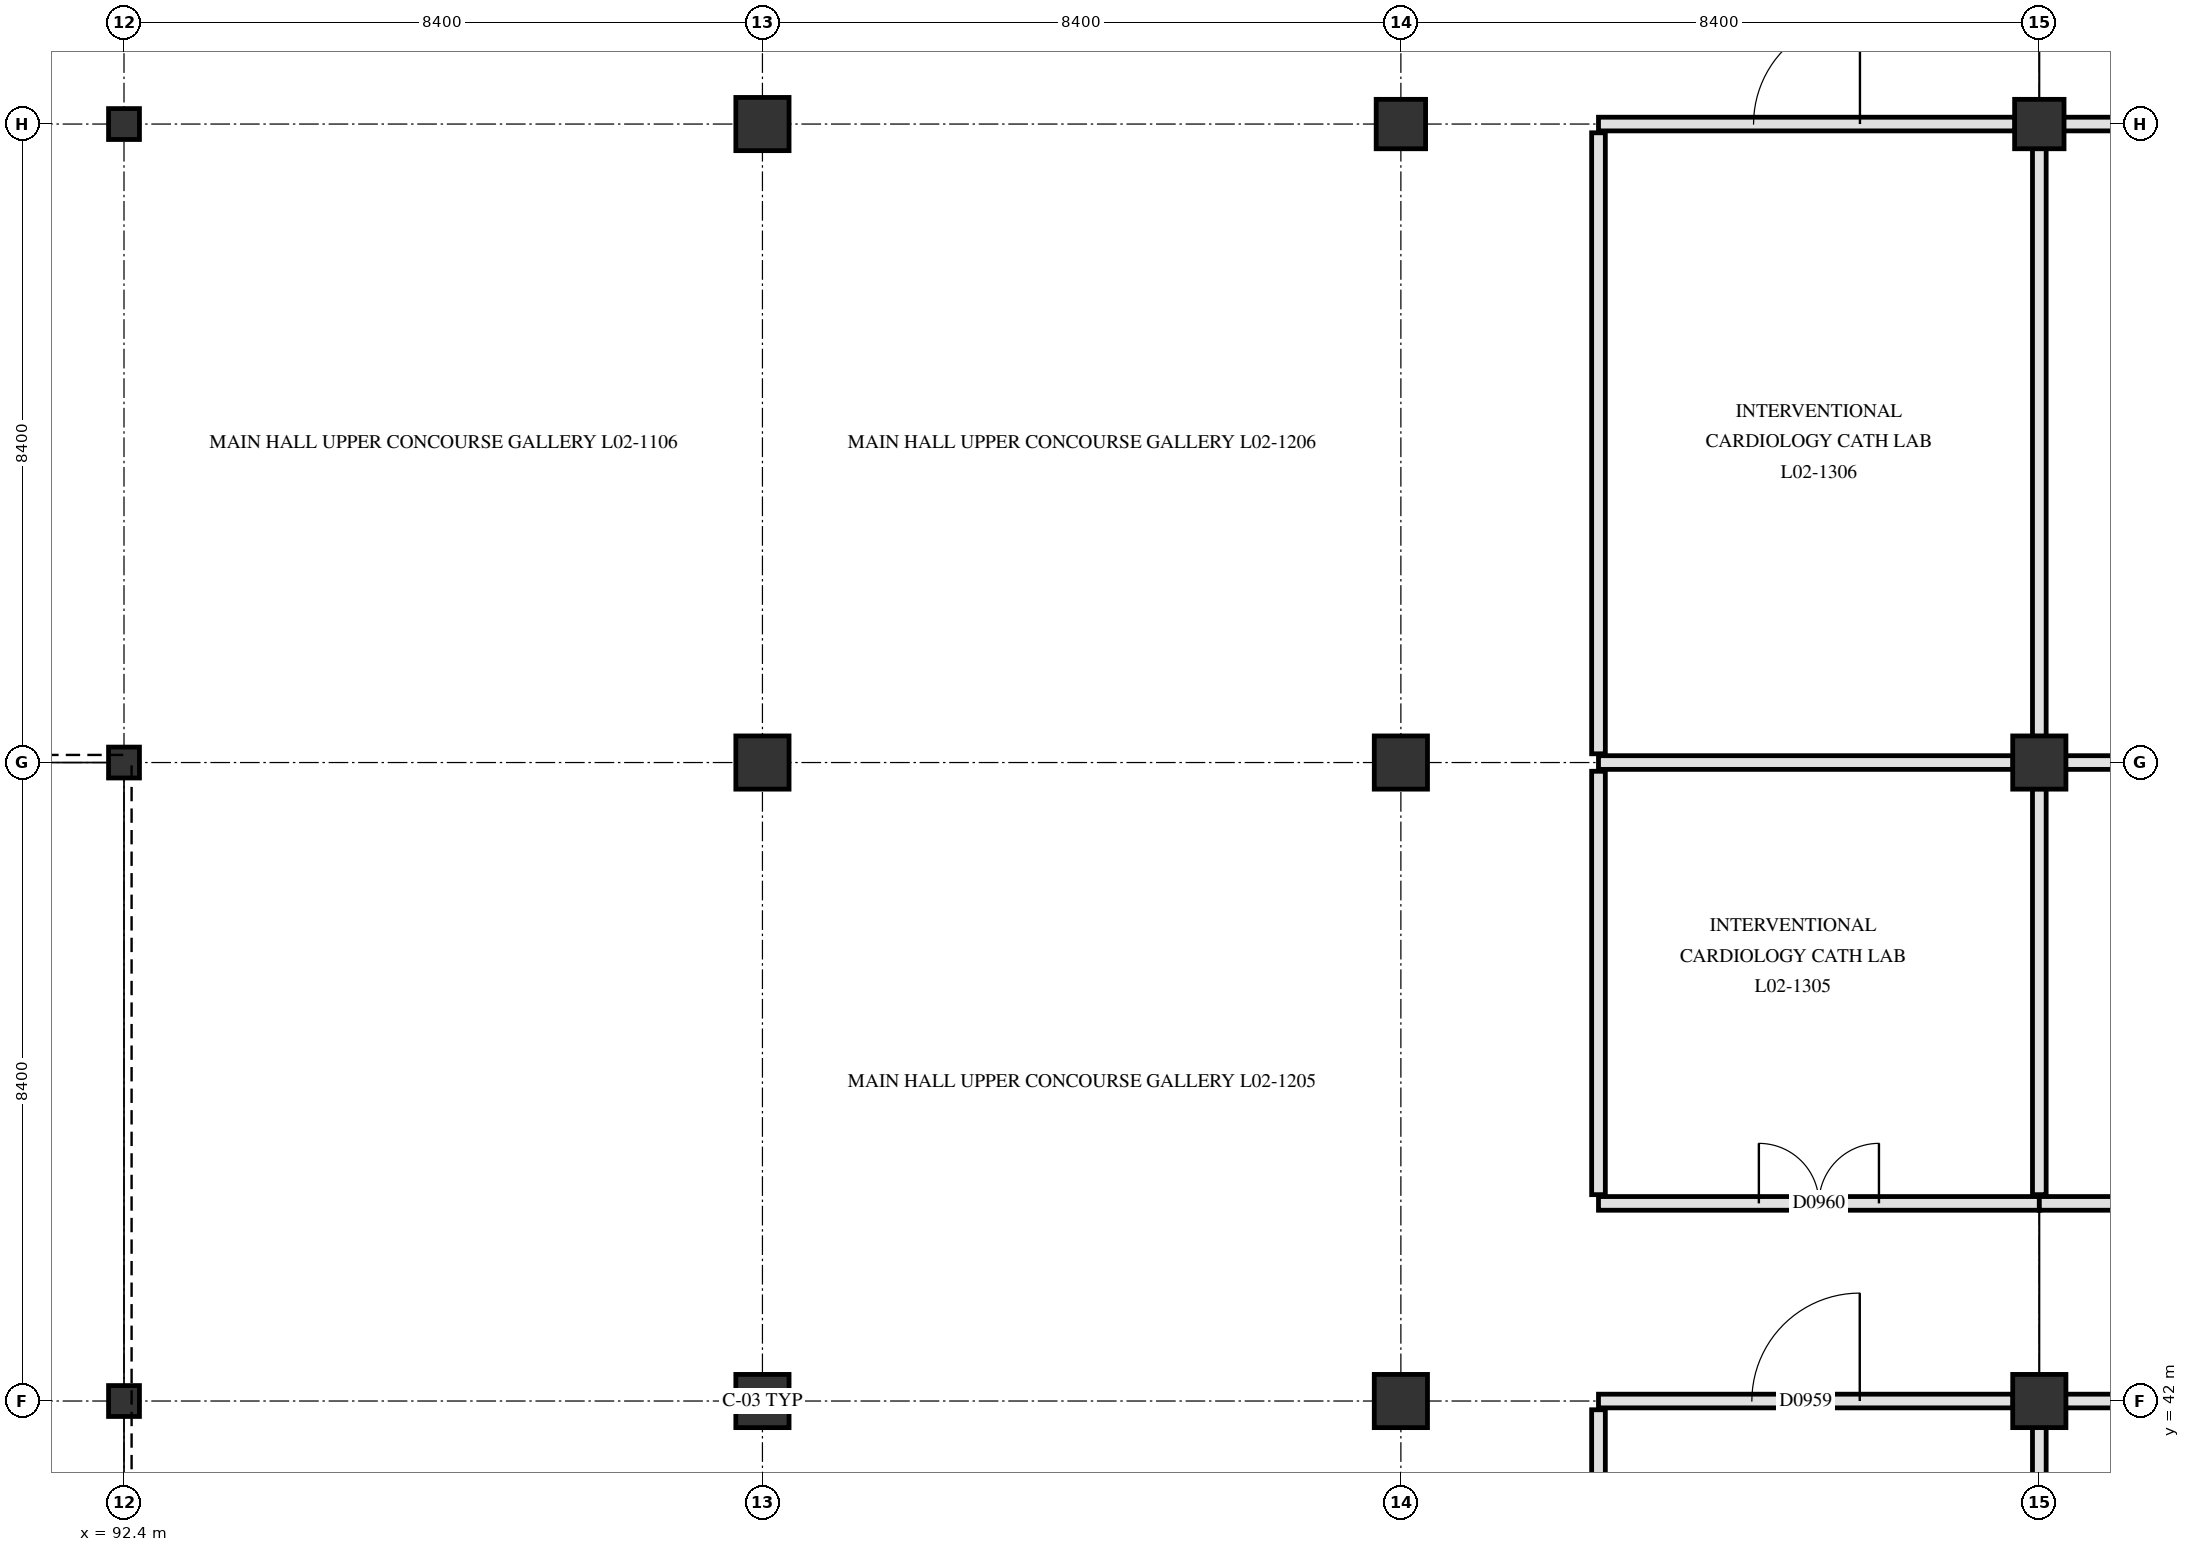
"""IFC4 building model, lengths in metres.
Left out: names, types, materials, properties, quantities, classifications, styles, units other than length and angle.
Written with IfcOpenShell. Run it as: python <this file> out.ifc"""

import sys

from ifc_helpers import new_model, si_unit, direction, frame, frame_2d, origin, origin_2d, place, context, subcontext, project, spatial, rectangle, circle, hollow_circle, extrude, element, fill, save


model = new_model("IFC4")
c1 = context("Model", 3, precision=1e-05, world=origin(), true_north=direction((0.0, 1.0)))
c2 = subcontext(c1, "Body", "Model", "MODEL_VIEW")
j1 = project(units=[si_unit("LENGTHUNIT", "METRE"), si_unit("PLANEANGLEUNIT", "RADIAN")], contexts=[c1])
p1 = place(None, origin())
s1 = spatial("IfcSite", under=j1, at=p1, CompositionType="ELEMENT")
p2 = place(p1, origin())
s2 = spatial("IfcBuilding", under=s1, at=p2, CompositionType="ELEMENT")
p3 = place(p2, frame((0.0, 0.0, 9.3)))
s3 = spatial("IfcBuildingStorey", under=s2, at=p3, CompositionType="ELEMENT", Elevation=9.3)
for number, where, z_axis, x_axis in (
    (1, (92.4, 42.0, 0.0), (0.0, 0.0, 1.0), (1.0, 0.0, 0.0)),
    (2, (92.4, 50.4, 0.0), (0.0, 0.0, 1.0), (1.0, 0.0, 0.0)),
    (3, (92.4, 58.8, 0.0), (0.0, 0.0, 1.0), (1.0, 0.0, 0.0)),
):
    element("IfcColumn", number, at=place(p3, frame(where, z_axis=z_axis, x_axis=x_axis)), inside=s3, PredefinedType="COLUMN", context=c2, shape_type="SweptSolid", body=[
        extrude(hollow_circle(Radius=0.203, WallThickness=0.016, at=origin_2d()), origin(), (0.0, 0.0, 1.0), 5.1),
    ])
for number, where, z_axis, x_axis in (
    (4, (100.8, 42.0, 0.0), (0.0, 0.0, 1.0), (1.0, 0.0, 0.0)),
    (5, (100.8, 50.4, 0.0), (0.0, 0.0, 1.0), (1.0, 0.0, 0.0)),
    (6, (100.8, 58.8, 0.0), (0.0, 0.0, 1.0), (1.0, 0.0, 0.0)),
    (7, (109.2, 42.0, 0.0), (0.0, 0.0, 1.0), (1.0, 0.0, 0.0)),
    (8, (109.2, 50.4, 0.0), (0.0, 0.0, 1.0), (1.0, 0.0, 0.0)),
):
    element("IfcColumn", number, at=place(p3, frame(where, z_axis=z_axis, x_axis=x_axis)), inside=s3, PredefinedType="COLUMN", context=c2, shape_type="SweptSolid", body=[
        extrude(rectangle(XDim=0.7, YDim=0.7, at=origin_2d()), origin(), (0.0, 0.0, 1.0), 5.1),
    ])
p4 = place(p3, frame((109.2, 58.8, 0.0), z_axis=(0.0, 0.0, 1.0), x_axis=(1.0, 0.0, 0.0)))
e9 = element("IfcColumn", 9, at=p4, inside=s3, PredefinedType="COLUMN", context=c2, shape_type="SweptSolid", body=[
    extrude(circle(Radius=0.325, at=origin_2d()), origin(), (0.0, 0.0, 1.0), 5.1),
])
for number, where, z_axis, x_axis in (
    (10, (117.6, 42.0, 0.0), (0.0, 0.0, 1.0), (1.0, 0.0, 0.0)),
    (11, (117.6, 50.4, 0.0), (0.0, 0.0, 1.0), (1.0, 0.0, 0.0)),
):
    element("IfcColumn", number, at=place(p3, frame(where, z_axis=z_axis, x_axis=x_axis)), inside=s3, PredefinedType="COLUMN", context=c2, shape_type="SweptSolid", body=[
        extrude(rectangle(XDim=0.7, YDim=0.7, at=origin_2d()), origin(), (0.0, 0.0, 1.0), 5.1),
    ])
p5 = place(p3, frame((117.6, 58.8, 0.0), z_axis=(0.0, 0.0, 1.0), x_axis=(1.0, 0.0, 0.0)))
e12 = element("IfcColumn", 12, at=p5, inside=s3, PredefinedType="COLUMN", context=c2, shape_type="SweptSolid", body=[
    extrude(circle(Radius=0.325, at=origin_2d()), origin(), (0.0, 0.0, 1.0), 5.1),
])
p6 = place(p3, frame((111.8, 42.0, 0.0), z_axis=(0.0, 0.0, 1.0), x_axis=(1.0, 0.0, 0.0)))
e13 = element("IfcWall", 13, at=p6, inside=s3, PredefinedType="PARTITIONING", context=c2, shape_type="SweptSolid", body=[
    extrude(rectangle(XDim=5.455, YDim=0.18, at=frame_2d((2.728, 0.0))), origin(), (0.0, 0.0, 1.0), 4.17),
])
p7 = place(p6, frame((2.018, 0.0, 0.0)))
e14 = element("IfcOpeningElement", 14, at=p7, cuts=e13, PredefinedType="OPENING", context=c2, shape_type="SweptSolid", body=[
    extrude(rectangle(XDim=1.42, YDim=2.22, at=frame_2d((0.71, 1.11))), frame((0.0, 0.1, 0.0), z_axis=(0.0, -1.0, 0.0), x_axis=(1.0, 0.0, 0.0)), (0.0, 0.0, 1.0), 0.2),
])
p8 = place(p3, frame((117.945, 42.0, 0.0), z_axis=(0.0, 0.0, 1.0), x_axis=(1.0, 0.0, 0.0)))
e15 = element("IfcWall", 15, at=p8, inside=s3, PredefinedType="PARTITIONING", context=c2, shape_type="SweptSolid", body=[
    extrude(rectangle(XDim=7.81, YDim=0.18, at=frame_2d((3.905, 0.0))), origin(), (0.0, 0.0, 1.0), 4.17),
])
p9 = place(p8, frame((3.33, 0.0, 0.0)))
e16 = element("IfcOpeningElement", 16, at=p9, cuts=e15, PredefinedType="OPENING", context=c2, shape_type="SweptSolid", body=[
    extrude(rectangle(XDim=1.15, YDim=2.15, at=frame_2d((0.575, 1.075))), frame((0.0, 0.1, 0.0), z_axis=(0.0, -1.0, 0.0), x_axis=(1.0, 0.0, 0.0)), (0.0, 0.0, 1.0), 0.2),
])
p10 = place(p3, frame((111.8, 44.6, 0.0), z_axis=(0.0, 0.0, 1.0), x_axis=(1.0, 0.0, 0.0)))
e17 = element("IfcWall", 17, at=p10, inside=s3, PredefinedType="PARTITIONING", context=c2, shape_type="SweptSolid", body=[
    extrude(rectangle(XDim=5.8, YDim=0.18, at=frame_2d((2.9, 0.0))), origin(), (0.0, 0.0, 1.0), 4.17),
])
p11 = place(p10, frame((2.11, 0.0, 0.0)))
e18 = element("IfcOpeningElement", 18, at=p11, cuts=e17, PredefinedType="OPENING", context=c2, shape_type="SweptSolid", body=[
    extrude(rectangle(XDim=1.58, YDim=2.22, at=frame_2d((0.79, 1.11))), frame((0.0, 0.1, 0.0), z_axis=(0.0, -1.0, 0.0), x_axis=(1.0, 0.0, 0.0)), (0.0, 0.0, 1.0), 0.2),
])
p12 = place(p3, frame((117.6, 44.6, 0.0), z_axis=(0.0, 0.0, 1.0), x_axis=(1.0, 0.0, 0.0)))
e19 = element("IfcWall", 19, at=p12, inside=s3, PredefinedType="PARTITIONING", context=c2, shape_type="SweptSolid", body=[
    extrude(rectangle(XDim=8.12, YDim=0.18, at=frame_2d((4.06, 0.0))), origin(), (0.0, 0.0, 1.0), 4.17),
])
p13 = place(p12, frame((3.46, 0.0, 0.0)))
e20 = element("IfcOpeningElement", 20, at=p13, cuts=e19, PredefinedType="OPENING", context=c2, shape_type="SweptSolid", body=[
    extrude(rectangle(XDim=1.2, YDim=2.15, at=frame_2d((0.6, 1.075))), frame((0.0, 0.1, 0.0), z_axis=(0.0, -1.0, 0.0), x_axis=(1.0, 0.0, 0.0)), (0.0, 0.0, 1.0), 0.2),
])
p14 = place(p3, frame((111.8, 50.4, 0.0), z_axis=(0.0, 0.0, 1.0), x_axis=(1.0, 0.0, 0.0)))
e21 = element("IfcWall", 21, at=p14, inside=s3, PredefinedType="PARTITIONING", context=c2, shape_type="SweptSolid", body=[
    extrude(rectangle(XDim=5.455, YDim=0.18, at=frame_2d((2.728, 0.0))), origin(), (0.0, 0.0, 1.0), 4.17),
])
p15 = place(p3, frame((117.945, 50.4, 0.0), z_axis=(0.0, 0.0, 1.0), x_axis=(1.0, 0.0, 0.0)))
e22 = element("IfcWall", 22, at=p15, inside=s3, PredefinedType="PARTITIONING", context=c2, shape_type="SweptSolid", body=[
    extrude(rectangle(XDim=7.81, YDim=0.18, at=frame_2d((3.905, 0.0))), origin(), (0.0, 0.0, 1.0), 4.17),
])
p16 = place(p3, frame((111.8, 58.8, 0.0), z_axis=(0.0, 0.0, 1.0), x_axis=(1.0, 0.0, 0.0)))
e23 = element("IfcWall", 23, at=p16, inside=s3, PredefinedType="PARTITIONING", context=c2, shape_type="SweptSolid", body=[
    extrude(rectangle(XDim=5.48, YDim=0.18, at=frame_2d((2.74, 0.0))), origin(), (0.0, 0.0, 1.0), 4.17),
])
p17 = place(p16, frame((2.04, 0.0, 0.0)))
e24 = element("IfcOpeningElement", 24, at=p17, cuts=e23, PredefinedType="OPENING", context=c2, shape_type="SweptSolid", body=[
    extrude(rectangle(XDim=1.4, YDim=2.2, at=frame_2d((0.7, 1.1))), frame((0.0, 0.1, 0.0), z_axis=(0.0, -1.0, 0.0), x_axis=(1.0, 0.0, 0.0)), (0.0, 0.0, 1.0), 0.2),
])
p18 = place(p3, frame((117.92, 58.8, 0.0), z_axis=(0.0, 0.0, 1.0), x_axis=(1.0, 0.0, 0.0)))
e25 = element("IfcWall", 25, at=p18, inside=s3, PredefinedType="PARTITIONING", context=c2, shape_type="SweptSolid", body=[
    extrude(rectangle(XDim=7.76, YDim=0.18, at=frame_2d((3.88, 0.0))), origin(), (0.0, 0.0, 1.0), 4.17),
])
p19 = place(p18, frame((3.255, 0.0, 0.0)))
e26 = element("IfcOpeningElement", 26, at=p19, cuts=e25, PredefinedType="OPENING", context=c2, shape_type="SweptSolid", body=[
    extrude(rectangle(XDim=1.25, YDim=2.2, at=frame_2d((0.625, 1.1))), frame((0.0, 0.1, 0.0), z_axis=(0.0, -1.0, 0.0), x_axis=(1.0, 0.0, 0.0)), (0.0, 0.0, 1.0), 0.2),
])
p20 = place(p3, frame((111.8, 33.715, 0.0), z_axis=(0.0, 0.0, 1.0), x_axis=(0.0, 1.0, 0.0)))
e27 = element("IfcWall", 27, at=p20, inside=s3, PredefinedType="PARTITIONING", context=c2, shape_type="SweptSolid", body=[
    extrude(rectangle(XDim=8.17, YDim=0.18, at=frame_2d((4.085, 0.0))), origin(), (0.0, 0.0, 1.0), 4.17),
])
p21 = place(p3, frame((111.8, 44.715, 0.0), z_axis=(0.0, 0.0, 1.0), x_axis=(0.0, 1.0, 0.0)))
e28 = element("IfcWall", 28, at=p21, inside=s3, PredefinedType="PARTITIONING", context=c2, shape_type="SweptSolid", body=[
    extrude(rectangle(XDim=5.57, YDim=0.18, at=frame_2d((2.785, 0.0))), origin(), (0.0, 0.0, 1.0), 4.17),
])
p22 = place(p3, frame((111.8, 50.515, 0.0), z_axis=(0.0, 0.0, 1.0), x_axis=(0.0, 1.0, 0.0)))
e29 = element("IfcWall", 29, at=p22, inside=s3, PredefinedType="PARTITIONING", context=c2, shape_type="SweptSolid", body=[
    extrude(rectangle(XDim=8.17, YDim=0.18, at=frame_2d((4.085, 0.0))), origin(), (0.0, 0.0, 1.0), 4.17),
])
p23 = place(p3, frame((117.6, 33.945, 0.0), z_axis=(0.0, 0.0, 1.0), x_axis=(0.0, 1.0, 0.0)))
e30 = element("IfcWall", 30, at=p23, inside=s3, PredefinedType="PARTITIONING", context=c2, shape_type="SweptSolid", body=[
    extrude(rectangle(XDim=7.71, YDim=0.18, at=frame_2d((3.855, 0.0))), origin(), (0.0, 0.0, 1.0), 4.17),
])
p24 = place(p3, frame((117.6, 44.715, 0.0), z_axis=(0.0, 0.0, 1.0), x_axis=(0.0, 1.0, 0.0)))
e31 = element("IfcWall", 31, at=p24, inside=s3, PredefinedType="PARTITIONING", context=c2, shape_type="SweptSolid", body=[
    extrude(rectangle(XDim=5.34, YDim=0.18, at=frame_2d((2.67, 0.0))), origin(), (0.0, 0.0, 1.0), 4.17),
])
p25 = place(p3, frame((117.6, 50.745, 0.0), z_axis=(0.0, 0.0, 1.0), x_axis=(0.0, 1.0, 0.0)))
e32 = element("IfcWall", 32, at=p25, inside=s3, PredefinedType="PARTITIONING", context=c2, shape_type="SweptSolid", body=[
    extrude(rectangle(XDim=7.735, YDim=0.18, at=frame_2d((3.867, 0.0))), origin(), (0.0, 0.0, 1.0), 4.17),
])
p26 = place(p7, origin())
e33 = element("IfcDoor", 33, at=p26, inside=s3, OperationType="SINGLE_SWING_RIGHT", PredefinedType="DOOR", context=c2, shape_type="SweptSolid", body=[
    extrude(rectangle(XDim=1.42, YDim=2.22, at=frame_2d((0.71, 1.11))), frame((0.0, 0.025, 0.0), z_axis=(0.0, -1.0, 0.0), x_axis=(1.0, 0.0, 0.0)), (0.0, 0.0, 1.0), 0.05),
])
fill(e14, e33)
p27 = place(p11, origin())
e34 = element("IfcDoor", 34, at=p27, inside=s3, OperationType="DOUBLE_SWING_LEFT", PredefinedType="DOOR", context=c2, shape_type="SweptSolid", body=[
    extrude(rectangle(XDim=1.58, YDim=2.22, at=frame_2d((0.79, 1.11))), frame((0.0, 0.025, 0.0), z_axis=(0.0, -1.0, 0.0), x_axis=(1.0, 0.0, 0.0)), (0.0, 0.0, 1.0), 0.05),
])
fill(e18, e34)
p28 = place(p17, origin())
e35 = element("IfcDoor", 35, at=p28, inside=s3, OperationType="SINGLE_SWING_RIGHT", PredefinedType="DOOR", context=c2, shape_type="SweptSolid", body=[
    extrude(rectangle(XDim=1.4, YDim=2.2, at=frame_2d((0.7, 1.1))), frame((0.0, 0.025, 0.0), z_axis=(0.0, -1.0, 0.0), x_axis=(1.0, 0.0, 0.0)), (0.0, 0.0, 1.0), 0.05),
])
fill(e24, e35)
save(model, sys.argv[1])
